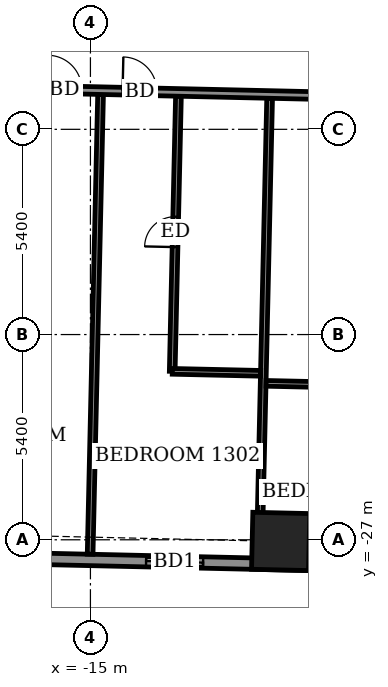
"""IFC4 building model, lengths in metres.
Left out: names, types, materials, properties, quantities, classifications, styles, units other than length and angle.
Written with IfcOpenShell. Run it as: python <this file> out.ifc"""

import sys

from ifc_helpers import new_model, si_unit, direction, frame, frame_2d, origin, origin_2d, place, context, subcontext, project, spatial, rectangle, extrude, element, fill, save


model = new_model("IFC4")
c1 = context("Model", 3, precision=1e-05, world=origin(), true_north=direction((0.0, 1.0)))
c2 = subcontext(c1, "Body", "Model", "MODEL_VIEW")
j1 = project(units=[si_unit("LENGTHUNIT", "METRE"), si_unit("PLANEANGLEUNIT", "RADIAN")], contexts=[c1])
p1 = place(None, origin())
s1 = spatial("IfcSite", under=j1, at=p1, CompositionType="ELEMENT")
p2 = place(p1, origin())
s2 = spatial("IfcBuilding", under=s1, at=p2, CompositionType="ELEMENT")
p3 = place(p2, frame((0.0, 0.0, 56.7)))
s3 = spatial("IfcBuildingStorey", under=s2, at=p3, CompositionType="ELEMENT", Elevation=56.7)
p4 = place(p3, frame((-9.994, -27.043, -0.55), z_axis=(0.0, 0.0, 1.0), x_axis=(0.999742783124, -0.022679673549, 0.0)))
e1 = element("IfcColumn", 1, at=p4, inside=s3, PredefinedType="COLUMN", context=c2, shape_type="SweptSolid", body=[
    extrude(rectangle(XDim=1.5, YDim=1.5, at=origin_2d()), origin(), (0.0, 0.0, 1.0), 3.6),
])
p5 = place(p3, frame((-24.007, -27.326, 0.0), z_axis=(0.0, 0.0, 1.0), x_axis=(0.999742536491, -0.022690542744, 0.0)))
e2 = element("IfcWall", 2, at=p5, inside=s3, PredefinedType="SOLIDWALL", context=c2, shape_type="SweptSolid", body=[
    extrude(rectangle(XDim=49.236, YDim=0.3, at=frame_2d((24.618, 0.0))), origin(), (0.0, 0.0, 1.0), 3.05),
])
p6 = place(p5, frame((2.115, 0.0, 0.0)))
e3 = element("IfcOpeningElement", 3, at=p6, cuts=e2, PredefinedType="OPENING", context=c2, shape_type="SweptSolid", body=[
    extrude(rectangle(XDim=1.5, YDim=2.4, at=frame_2d((0.75, 1.2))), frame((0.0, 0.16, 0.0), z_axis=(0.0, -1.0, 0.0), x_axis=(1.0, 0.0, 0.0)), (0.0, 0.0, 1.0), 0.32),
])
p7 = place(p5, frame((5.088, 0.0, 0.9)))
e4 = element("IfcOpeningElement", 4, at=p7, cuts=e2, PredefinedType="OPENING", context=c2, shape_type="SweptSolid", body=[
    extrude(rectangle(XDim=0.9, YDim=1.5, at=frame_2d((0.45, 0.75))), frame((0.0, 0.16, 0.0), z_axis=(0.0, -1.0, 0.0), x_axis=(1.0, 0.0, 0.0)), (0.0, 0.0, 1.0), 0.32),
])
p8 = place(p5, frame((10.475, 0.0, 0.0)))
e5 = element("IfcOpeningElement", 5, at=p8, cuts=e2, PredefinedType="OPENING", context=c2, shape_type="SweptSolid", body=[
    extrude(rectangle(XDim=1.5, YDim=2.4, at=frame_2d((0.75, 1.2))), frame((0.0, 0.16, 0.0), z_axis=(0.0, -1.0, 0.0), x_axis=(1.0, 0.0, 0.0)), (0.0, 0.0, 1.0), 0.32),
])
p9 = place(p5, frame((15.477, 0.0, 0.0)))
e6 = element("IfcOpeningElement", 6, at=p9, cuts=e2, PredefinedType="OPENING", context=c2, shape_type="SweptSolid", body=[
    extrude(rectangle(XDim=1.5, YDim=2.4, at=frame_2d((0.75, 1.2))), frame((0.0, 0.16, 0.0), z_axis=(0.0, -1.0, 0.0), x_axis=(1.0, 0.0, 0.0)), (0.0, 0.0, 1.0), 0.32),
])
p10 = place(p5, frame((18.515, 0.0, 0.0)))
e7 = element("IfcOpeningElement", 7, at=p10, cuts=e2, PredefinedType="OPENING", context=c2, shape_type="SweptSolid", body=[
    extrude(rectangle(XDim=1.5, YDim=2.4, at=frame_2d((0.75, 1.2))), frame((0.0, 0.16, 0.0), z_axis=(0.0, -1.0, 0.0), x_axis=(1.0, 0.0, 0.0)), (0.0, 0.0, 1.0), 0.32),
])
p11 = place(p5, frame((23.825, 0.0, 0.0)))
e8 = element("IfcOpeningElement", 8, at=p11, cuts=e2, PredefinedType="OPENING", context=c2, shape_type="SweptSolid", body=[
    extrude(rectangle(XDim=1.5, YDim=2.4, at=frame_2d((0.75, 1.2))), frame((0.0, 0.16, 0.0), z_axis=(0.0, -1.0, 0.0), x_axis=(1.0, 0.0, 0.0)), (0.0, 0.0, 1.0), 0.32),
])
p12 = place(p5, frame((29.128, 0.0, 0.0)))
e9 = element("IfcOpeningElement", 9, at=p12, cuts=e2, PredefinedType="OPENING", context=c2, shape_type="SweptSolid", body=[
    extrude(rectangle(XDim=1.5, YDim=2.4, at=frame_2d((0.75, 1.2))), frame((0.0, 0.16, 0.0), z_axis=(0.0, -1.0, 0.0), x_axis=(1.0, 0.0, 0.0)), (0.0, 0.0, 1.0), 0.32),
])
p13 = place(p5, frame((32.166, 0.0, 0.0)))
e10 = element("IfcOpeningElement", 10, at=p13, cuts=e2, PredefinedType="OPENING", context=c2, shape_type="SweptSolid", body=[
    extrude(rectangle(XDim=1.5, YDim=2.4, at=frame_2d((0.75, 1.2))), frame((0.0, 0.16, 0.0), z_axis=(0.0, -1.0, 0.0), x_axis=(1.0, 0.0, 0.0)), (0.0, 0.0, 1.0), 0.32),
])
p14 = place(p5, frame((37.091, 0.0, 0.0)))
e11 = element("IfcOpeningElement", 11, at=p14, cuts=e2, PredefinedType="OPENING", context=c2, shape_type="SweptSolid", body=[
    extrude(rectangle(XDim=1.5, YDim=2.4, at=frame_2d((0.75, 1.2))), frame((0.0, 0.16, 0.0), z_axis=(0.0, -1.0, 0.0), x_axis=(1.0, 0.0, 0.0)), (0.0, 0.0, 1.0), 0.32),
])
p15 = place(p5, frame((40.205, 0.0, 0.0)))
e12 = element("IfcOpeningElement", 12, at=p15, cuts=e2, PredefinedType="OPENING", context=c2, shape_type="SweptSolid", body=[
    extrude(rectangle(XDim=1.2, YDim=2.4, at=frame_2d((0.6, 1.2))), frame((0.0, 0.16, 0.0), z_axis=(0.0, -1.0, 0.0), x_axis=(1.0, 0.0, 0.0)), (0.0, 0.0, 1.0), 0.32),
])
p16 = place(p5, frame((45.047, 0.0, 0.9)))
e13 = element("IfcOpeningElement", 13, at=p16, cuts=e2, PredefinedType="OPENING", context=c2, shape_type="SweptSolid", body=[
    extrude(rectangle(XDim=2.4, YDim=1.5, at=frame_2d((1.2, 0.75))), frame((0.0, 0.16, 0.0), z_axis=(0.0, -1.0, 0.0), x_axis=(1.0, 0.0, 0.0)), (0.0, 0.0, 1.0), 0.32),
])
p17 = place(p3, frame((-15.008, -27.38, 0.0), z_axis=(0.0, 0.0, 1.0), x_axis=(0.02273928012, 0.99974142914, 0.0)))
e14 = element("IfcWall", 14, at=p17, inside=s3, PredefinedType="PARTITIONING", context=c2, shape_type="SweptSolid", body=[
    extrude(rectangle(XDim=12.1, YDim=0.15, at=frame_2d((6.05, 0.0))), origin(), (0.0, 0.0, 1.0), 2.55),
])
p18 = place(p3, frame((-10.559, -27.481, 0.0), z_axis=(0.0, 0.0, 1.0), x_axis=(0.022658614335, 0.999743260641, 0.0)))
e15 = element("IfcWall", 15, at=p18, inside=s3, PredefinedType="PARTITIONING", context=c2, shape_type="SweptSolid", body=[
    extrude(rectangle(XDim=12.1, YDim=0.15, at=frame_2d((6.05, 0.0))), origin(), (0.0, 0.0, 1.0), 3.05),
])
p19 = place(p3, frame((-10.378, -22.884, 0.0), z_axis=(0.0, 0.0, 1.0), x_axis=(0.999749954681, -0.022361308448, 0.0)))
e16 = element("IfcWall", 16, at=p19, inside=s3, PredefinedType="PARTITIONING", context=c2, shape_type="SweptSolid", body=[
    extrude(rectangle(XDim=2.325, YDim=0.15, at=frame_2d((1.163, 0.0))), origin(), (0.0, 0.0, 1.0), 3.05),
])
p20 = place(p3, frame((-12.848, -22.568, 0.0), z_axis=(0.0, 0.0, 1.0), x_axis=(0.022624135841, 0.999744041481, 0.0)))
e17 = element("IfcWall", 17, at=p20, inside=s3, PredefinedType="PARTITIONING", context=c2, shape_type="SweptSolid", body=[
    extrude(rectangle(XDim=7.241, YDim=0.15, at=frame_2d((3.621, 0.0))), origin(), (0.0, 0.0, 1.0), 3.05),
])
p21 = place(p20, frame((3.27, 0.0, 0.0)))
e18 = element("IfcOpeningElement", 18, at=p21, cuts=e17, PredefinedType="OPENING", context=c2, shape_type="SweptSolid", body=[
    extrude(rectangle(XDim=0.8, YDim=2.1, at=frame_2d((0.4, 1.05))), frame((0.0, 0.085, 0.0), z_axis=(0.0, -1.0, 0.0), x_axis=(1.0, 0.0, 0.0)), (0.0, 0.0, 1.0), 0.17),
])
p22 = place(p3, frame((-12.846, -22.568, 0.0), z_axis=(0.0, 0.0, 1.0), x_axis=(0.999749744571, -0.022370700241, 0.0)))
e19 = element("IfcWall", 19, at=p22, inside=s3, PredefinedType="PARTITIONING", context=c2, shape_type="SweptSolid", body=[
    extrude(rectangle(XDim=2.324, YDim=0.15, at=frame_2d((1.162, 0.0))), origin(), (0.0, 0.0, 1.0), 3.05),
])
p23 = place(p3, frame((-26.126, -14.924, 0.0), z_axis=(0.0, 0.0, 1.0), x_axis=(0.999742687583, -0.0226838847, 0.0)))
e20 = element("IfcWall", 20, at=p23, inside=s3, PredefinedType="PARTITIONING", context=c2, shape_type="SweptSolid", body=[
    extrude(rectangle(XDim=54.836, YDim=0.2, at=frame_2d((27.418, 0.0))), origin(), (0.0, 0.0, 1.0), 3.05),
])
p24 = place(p23, frame((0.775, 0.0, 0.0)))
e21 = element("IfcOpeningElement", 21, at=p24, cuts=e20, PredefinedType="OPENING", context=c2, shape_type="SweptSolid", body=[
    extrude(rectangle(XDim=1.0, YDim=2.1, at=frame_2d((0.5, 1.05))), frame((0.0, 0.11, 0.0), z_axis=(0.0, -1.0, 0.0), x_axis=(1.0, 0.0, 0.0)), (0.0, 0.0, 1.0), 0.22),
])
p25 = place(p23, frame((5.45, 0.0, 0.0)))
e22 = element("IfcOpeningElement", 22, at=p25, cuts=e20, PredefinedType="OPENING", context=c2, shape_type="SweptSolid", body=[
    extrude(rectangle(XDim=0.9, YDim=2.1, at=frame_2d((0.45, 1.05))), frame((0.0, 0.11, 0.0), z_axis=(0.0, -1.0, 0.0), x_axis=(1.0, 0.0, 0.0)), (0.0, 0.0, 1.0), 0.22),
])
p26 = place(p23, frame((10.0, 0.0, 0.0)))
e23 = element("IfcOpeningElement", 23, at=p26, cuts=e20, PredefinedType="OPENING", context=c2, shape_type="SweptSolid", body=[
    extrude(rectangle(XDim=0.9, YDim=2.1, at=frame_2d((0.45, 1.05))), frame((0.0, 0.11, 0.0), z_axis=(0.0, -1.0, 0.0), x_axis=(1.0, 0.0, 0.0)), (0.0, 0.0, 1.0), 0.22),
])
p27 = place(p23, frame((11.975, 0.0, 0.0)))
e24 = element("IfcOpeningElement", 24, at=p27, cuts=e20, PredefinedType="OPENING", context=c2, shape_type="SweptSolid", body=[
    extrude(rectangle(XDim=0.9, YDim=2.1, at=frame_2d((0.45, 1.05))), frame((0.0, 0.11, 0.0), z_axis=(0.0, -1.0, 0.0), x_axis=(1.0, 0.0, 0.0)), (0.0, 0.0, 1.0), 0.22),
])
p28 = place(p23, frame((18.85, 0.0, 0.0)))
e25 = element("IfcOpeningElement", 25, at=p28, cuts=e20, PredefinedType="OPENING", context=c2, shape_type="SweptSolid", body=[
    extrude(rectangle(XDim=0.9, YDim=2.1, at=frame_2d((0.45, 1.05))), frame((0.0, 0.11, 0.0), z_axis=(0.0, -1.0, 0.0), x_axis=(1.0, 0.0, 0.0)), (0.0, 0.0, 1.0), 0.22),
])
p29 = place(p23, frame((20.9, 0.0, 0.0)))
e26 = element("IfcOpeningElement", 26, at=p29, cuts=e20, PredefinedType="OPENING", context=c2, shape_type="SweptSolid", body=[
    extrude(rectangle(XDim=0.9, YDim=2.1, at=frame_2d((0.45, 1.05))), frame((0.0, 0.11, 0.0), z_axis=(0.0, -1.0, 0.0), x_axis=(1.0, 0.0, 0.0)), (0.0, 0.0, 1.0), 0.22),
])
p30 = place(p23, frame((27.725, 0.0, 0.0)))
e27 = element("IfcOpeningElement", 27, at=p30, cuts=e20, PredefinedType="OPENING", context=c2, shape_type="SweptSolid", body=[
    extrude(rectangle(XDim=0.9, YDim=2.1, at=frame_2d((0.45, 1.05))), frame((0.0, 0.11, 0.0), z_axis=(0.0, -1.0, 0.0), x_axis=(1.0, 0.0, 0.0)), (0.0, 0.0, 1.0), 0.22),
])
p31 = place(p23, frame((29.7, 0.0, 0.0)))
e28 = element("IfcOpeningElement", 28, at=p31, cuts=e20, PredefinedType="OPENING", context=c2, shape_type="SweptSolid", body=[
    extrude(rectangle(XDim=0.9, YDim=2.1, at=frame_2d((0.45, 1.05))), frame((0.0, 0.11, 0.0), z_axis=(0.0, -1.0, 0.0), x_axis=(1.0, 0.0, 0.0)), (0.0, 0.0, 1.0), 0.22),
])
p32 = place(p23, frame((36.5, 0.0, 0.0)))
e29 = element("IfcOpeningElement", 29, at=p32, cuts=e20, PredefinedType="OPENING", context=c2, shape_type="SweptSolid", body=[
    extrude(rectangle(XDim=0.9, YDim=2.1, at=frame_2d((0.45, 1.05))), frame((0.0, 0.11, 0.0), z_axis=(0.0, -1.0, 0.0), x_axis=(1.0, 0.0, 0.0)), (0.0, 0.0, 1.0), 0.22),
])
p33 = place(p23, frame((38.525, 0.0, 0.0)))
e30 = element("IfcOpeningElement", 30, at=p33, cuts=e20, PredefinedType="OPENING", context=c2, shape_type="SweptSolid", body=[
    extrude(rectangle(XDim=0.9, YDim=2.1, at=frame_2d((0.45, 1.05))), frame((0.0, 0.11, 0.0), z_axis=(0.0, -1.0, 0.0), x_axis=(1.0, 0.0, 0.0)), (0.0, 0.0, 1.0), 0.22),
])
p34 = place(p23, frame((45.325, 0.0, 0.0)))
e31 = element("IfcOpeningElement", 31, at=p34, cuts=e20, PredefinedType="OPENING", context=c2, shape_type="SweptSolid", body=[
    extrude(rectangle(XDim=0.9, YDim=2.1, at=frame_2d((0.45, 1.05))), frame((0.0, 0.11, 0.0), z_axis=(0.0, -1.0, 0.0), x_axis=(1.0, 0.0, 0.0)), (0.0, 0.0, 1.0), 0.22),
])
p35 = place(p23, frame((52.593, 0.0, 0.0)))
e32 = element("IfcOpeningElement", 32, at=p35, cuts=e20, PredefinedType="OPENING", context=c2, shape_type="SweptSolid", body=[
    extrude(rectangle(XDim=1.0, YDim=2.1, at=frame_2d((0.5, 1.05))), frame((0.0, 0.11, 0.0), z_axis=(0.0, -1.0, 0.0), x_axis=(1.0, 0.0, 0.0)), (0.0, 0.0, 1.0), 0.22),
])
p36 = place(p23, frame((47.55, 0.0, 0.0)))
e33 = element("IfcOpeningElement", 33, at=p36, cuts=e20, PredefinedType="OPENING", context=c2, shape_type="SweptSolid", body=[
    extrude(rectangle(XDim=0.9, YDim=2.1, at=frame_2d((0.45, 1.05))), frame((0.0, 0.11, 0.0), z_axis=(0.0, -1.0, 0.0), x_axis=(1.0, 0.0, 0.0)), (0.0, 0.0, 1.0), 0.22),
])
p37 = place(p8, origin())
e34 = element("IfcDoor", 34, at=p37, inside=s3, OperationType="SLIDING_TO_LEFT", PredefinedType="DOOR", context=c2, shape_type="SweptSolid", body=[
    extrude(rectangle(XDim=1.5, YDim=2.4, at=frame_2d((0.75, 1.2))), frame((0.0, 0.025, 0.0), z_axis=(0.0, -1.0, 0.0), x_axis=(1.0, 0.0, 0.0)), (0.0, 0.0, 1.0), 0.05),
])
fill(e5, e34)
p38 = place(p26, origin())
e35 = element("IfcDoor", 35, at=p38, inside=s3, OperationType="SINGLE_SWING_LEFT", PredefinedType="DOOR", context=c2, shape_type="SweptSolid", body=[
    extrude(rectangle(XDim=0.9, YDim=2.1, at=frame_2d((0.45, 1.05))), frame((0.0, 0.025, 0.0), z_axis=(0.0, -1.0, 0.0), x_axis=(1.0, 0.0, 0.0)), (0.0, 0.0, 1.0), 0.05),
])
fill(e23, e35)
p39 = place(p27, origin())
e36 = element("IfcDoor", 36, at=p39, inside=s3, OperationType="SINGLE_SWING_RIGHT", PredefinedType="DOOR", context=c2, shape_type="SweptSolid", body=[
    extrude(rectangle(XDim=0.9, YDim=2.1, at=frame_2d((0.45, 1.05))), frame((0.0, 0.025, 0.0), z_axis=(0.0, -1.0, 0.0), x_axis=(1.0, 0.0, 0.0)), (0.0, 0.0, 1.0), 0.05),
])
fill(e24, e36)
p40 = place(p21, origin())
e37 = element("IfcDoor", 37, at=p40, inside=s3, OperationType="SINGLE_SWING_RIGHT", PredefinedType="DOOR", context=c2, shape_type="SweptSolid", body=[
    extrude(rectangle(XDim=0.8, YDim=2.1, at=frame_2d((0.4, 1.05))), frame((0.0, 0.025, 0.0), z_axis=(0.0, -1.0, 0.0), x_axis=(1.0, 0.0, 0.0)), (0.0, 0.0, 1.0), 0.05),
])
fill(e18, e37)
save(model, sys.argv[1])
